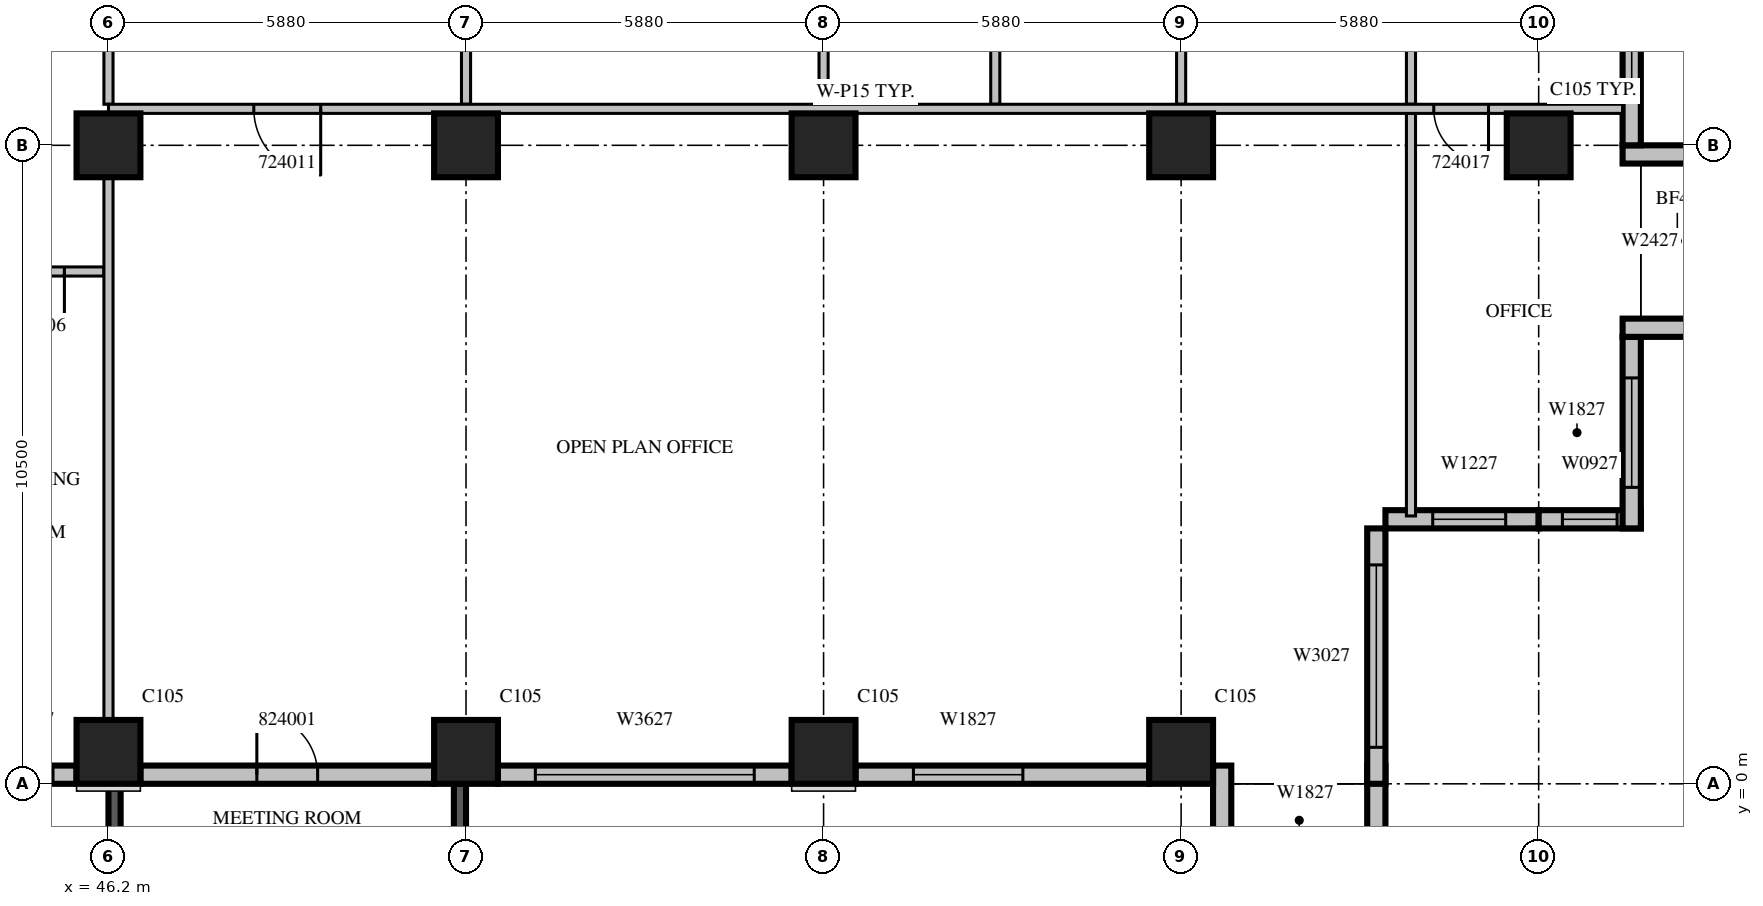
"""IFC4 building model, lengths in metres.
Left out: names, types, materials, properties, quantities, classifications, styles, units other than length and angle.
Written with IfcOpenShell. Run it as: python <this file> out.ifc"""

import sys

from ifc_helpers import new_model, si_unit, direction, frame, frame_2d, origin, origin_2d, place, context, subcontext, project, spatial, rectangle, extrude, source, transform, mapped, element, fill, save


model = new_model("IFC4")
c1 = context("Model", 3, precision=1e-05, world=origin(), true_north=direction((0.0, 1.0)))
c2 = subcontext(c1, "Body", "Model", "MODEL_VIEW")
j1 = project(units=[si_unit("LENGTHUNIT", "METRE"), si_unit("PLANEANGLEUNIT", "RADIAN")], contexts=[c1])
p1 = place(None, origin())
s1 = spatial("IfcSite", under=j1, at=p1, CompositionType="ELEMENT")
p2 = place(p1, origin())
s2 = spatial("IfcBuilding", under=s1, at=p2, CompositionType="ELEMENT")
p3 = place(p2, frame((0.0, 0.0, 111.9)))
s3 = spatial("IfcBuildingStorey", under=s2, at=p3, CompositionType="ELEMENT", Elevation=111.9)
m1 = source(origin(), c2, "Body", "SweptSolid", [
    extrude(rectangle(XDim=1.05, YDim=1.05, at=origin_2d()), origin(), (0.0, 0.0, 1.0), 4.2),
])
for number, where, z_axis, x_axis in (
    (1, (46.2, 0.525, 0.0), (0.0, 0.0, 1.0), (1.0, 0.0, 0.0)),
    (2, (52.08, 0.525, 0.0), (0.0, 0.0, 1.0), (1.0, 0.0, 0.0)),
    (3, (57.96, 0.525, 0.0), (0.0, 0.0, 1.0), (1.0, 0.0, 0.0)),
    (4, (63.84, 0.525, 0.0), (0.0, 0.0, 1.0), (1.0, 0.0, 0.0)),
    (5, (46.2, 10.5, 0.0), (0.0, 0.0, 1.0), (1.0, 0.0, 0.0)),
    (6, (52.08, 10.5, 0.0), (0.0, 0.0, 1.0), (1.0, 0.0, 0.0)),
    (7, (57.96, 10.5, 0.0), (0.0, 0.0, 1.0), (1.0, 0.0, 0.0)),
    (8, (63.84, 10.5, 0.0), (0.0, 0.0, 1.0), (1.0, 0.0, 0.0)),
    (9, (69.72, 10.5, 0.0), (0.0, 0.0, 1.0), (1.0, 0.0, 0.0)),
):
    element("IfcColumn", number, at=place(p3, frame(where, z_axis=z_axis, x_axis=x_axis)), inside=s3, PredefinedType="COLUMN", context=c2, shape_type="MappedRepresentation", body=[
        mapped(m1, transform((0.0, 0.0, 0.0), scale=1.0)),
    ])
m2 = source(origin(), c2, "Body", "SweptSolid", [
    extrude(rectangle(XDim=3.9, YDim=0.2, at=frame_2d((1.95, 0.0))), origin(), (0.0, 0.0, 1.0), 3.8),
])
p4 = place(p3, frame((46.3, 0.0, 0.0), z_axis=(0.0, 0.0, 1.0), x_axis=(0.0, -1.0, 0.0)))
e10 = element("IfcWall", 10, at=p4, inside=s3, PredefinedType="SOLIDWALL", context=c2, shape_type="MappedRepresentation", body=[
    mapped(m2, transform((0.0, 0.0, 0.0), scale=1.0)),
])
m3 = source(origin(), c2, "Body", "SweptSolid", [
    extrude(rectangle(XDim=2.4, YDim=2.7, at=frame_2d((1.2, 1.35))), frame((0.0, 0.11, 0.0), z_axis=(0.0, -1.0, 0.0), x_axis=(1.0, 0.0, 0.0)), (0.0, 0.0, 1.0), 0.22),
])
p5 = place(p4, frame((0.75, 0.0, 0.6)))
e11 = element("IfcOpeningElement", 11, at=p5, cuts=e10, PredefinedType="OPENING", context=c2, shape_type="MappedRepresentation", body=[
    mapped(m3, transform((0.0, 0.0, 0.0), scale=1.0)),
])
p6 = place(p3, frame((51.98, 0.0, 0.0), z_axis=(0.0, 0.0, 1.0), x_axis=(0.0, -1.0, 0.0)))
e12 = element("IfcWall", 12, at=p6, inside=s3, PredefinedType="SOLIDWALL", context=c2, shape_type="MappedRepresentation", body=[
    mapped(m2, transform((0.0, 0.0, 0.0), scale=1.0)),
])
p7 = place(p6, frame((0.75, 0.0, 0.6)))
e13 = element("IfcOpeningElement", 13, at=p7, cuts=e12, PredefinedType="OPENING", context=c2, shape_type="MappedRepresentation", body=[
    mapped(m3, transform((0.0, 0.0, 0.0), scale=1.0)),
])
m4 = source(origin(), c2, "Body", "SweptSolid", [
    extrude(rectangle(XDim=1.675, YDim=0.3, at=frame_2d((0.838, 0.0))), origin(), (0.0, 0.0, 1.0), 3.8),
])
p8 = place(p3, frame((44.0, 0.15, 0.0), z_axis=(0.0, 0.0, 1.0), x_axis=(1.0, 0.0, 0.0)))
e14 = element("IfcWall", 14, at=p8, inside=s3, PredefinedType="STANDARD", context=c2, shape_type="MappedRepresentation", body=[
    mapped(m4, transform((0.0, 0.0, 0.0), scale=1.0)),
])
m5 = source(origin(), c2, "Body", "SweptSolid", [
    extrude(rectangle(XDim=0.9, YDim=2.7, at=frame_2d((0.45, 1.35))), frame((0.0, 0.16, 0.0), z_axis=(0.0, -1.0, 0.0), x_axis=(1.0, 0.0, 0.0)), (0.0, 0.0, 1.0), 0.32),
])
p9 = place(p8, frame((0.388, 0.0, 0.6)))
e15 = element("IfcOpeningElement", 15, at=p9, cuts=e14, PredefinedType="OPENING", context=c2, shape_type="MappedRepresentation", body=[
    mapped(m5, transform((0.0, 0.0, 0.0), scale=1.0)),
])
m6 = source(origin(), c2, "Body", "SweptSolid", [
    extrude(rectangle(XDim=4.83, YDim=0.3, at=frame_2d((2.415, 0.0))), origin(), (0.0, 0.0, 1.0), 3.8),
])
p10 = place(p3, frame((46.725, 0.15, 0.0), z_axis=(0.0, 0.0, 1.0), x_axis=(1.0, 0.0, 0.0)))
e16 = element("IfcWall", 16, at=p10, inside=s3, PredefinedType="STANDARD", context=c2, shape_type="MappedRepresentation", body=[
    mapped(m6, transform((0.0, 0.0, 0.0), scale=1.0)),
])
m7 = source(origin(), c2, "Body", "SweptSolid", [
    extrude(rectangle(XDim=1.0, YDim=2.1, at=frame_2d((0.5, 1.05))), frame((0.0, 0.16, 0.0), z_axis=(0.0, -1.0, 0.0), x_axis=(1.0, 0.0, 0.0)), (0.0, 0.0, 1.0), 0.32),
])
p11 = place(p10, frame((1.915, 0.0, 0.0)))
e17 = element("IfcOpeningElement", 17, at=p11, cuts=e16, PredefinedType="OPENING", context=c2, shape_type="MappedRepresentation", body=[
    mapped(m7, transform((0.0, 0.0, 0.0), scale=1.0)),
])
p12 = place(p3, frame((52.605, 0.15, 0.0), z_axis=(0.0, 0.0, 1.0), x_axis=(1.0, 0.0, 0.0)))
e18 = element("IfcWall", 18, at=p12, inside=s3, PredefinedType="STANDARD", context=c2, shape_type="MappedRepresentation", body=[
    mapped(m6, transform((0.0, 0.0, 0.0), scale=1.0)),
])
m8 = source(origin(), c2, "Body", "SweptSolid", [
    extrude(rectangle(XDim=3.6, YDim=2.7, at=frame_2d((1.8, 1.35))), frame((0.0, 0.16, 0.0), z_axis=(0.0, -1.0, 0.0), x_axis=(1.0, 0.0, 0.0)), (0.0, 0.0, 1.0), 0.32),
])
p13 = place(p12, frame((0.615, 0.0, 0.6)))
e19 = element("IfcOpeningElement", 19, at=p13, cuts=e18, PredefinedType="OPENING", context=c2, shape_type="MappedRepresentation", body=[
    mapped(m8, transform((0.0, 0.0, 0.0), scale=1.0)),
])
p14 = place(p3, frame((58.485, 0.15, 0.0), z_axis=(0.0, 0.0, 1.0), x_axis=(1.0, 0.0, 0.0)))
e20 = element("IfcWall", 20, at=p14, inside=s3, PredefinedType="STANDARD", context=c2, shape_type="MappedRepresentation", body=[
    mapped(m6, transform((0.0, 0.0, 0.0), scale=1.0)),
])
m9 = source(origin(), c2, "Body", "SweptSolid", [
    extrude(rectangle(XDim=1.8, YDim=2.7, at=frame_2d((0.9, 1.35))), frame((0.0, 0.16, 0.0), z_axis=(0.0, -1.0, 0.0), x_axis=(1.0, 0.0, 0.0)), (0.0, 0.0, 1.0), 0.32),
])
p15 = place(p14, frame((0.953, 0.0, 0.6)))
e21 = element("IfcOpeningElement", 21, at=p15, cuts=e20, PredefinedType="OPENING", context=c2, shape_type="MappedRepresentation", body=[
    mapped(m9, transform((0.0, 0.0, 0.0), scale=1.0)),
])
m10 = source(origin(), c2, "Body", "SweptSolid", [
    extrude(rectangle(XDim=1.2, YDim=0.3, at=frame_2d((0.6, 0.0))), origin(), (0.0, 0.0, 1.0), 3.8),
])
for number, where, z_axis, x_axis in (
    (22, (64.515, 0.3, 0.0), (0.0, 0.0, 1.0), (0.0, -1.0, 0.0)),
    (23, (67.05, 0.3, 0.0), (0.0, 0.0, 1.0), (0.0, -1.0, 0.0)),
):
    element("IfcWall", number, at=place(p3, frame(where, z_axis=z_axis, x_axis=x_axis)), inside=s3, PredefinedType="STANDARD", context=c2, shape_type="MappedRepresentation", body=[
        mapped(m10, transform((0.0, 0.0, 0.0), scale=1.0)),
    ])
m11 = source(origin(), c2, "Body", "SweptSolid", [
    extrude(rectangle(XDim=4.2, YDim=0.3, at=frame_2d((2.1, 0.0))), origin(), (0.0, 0.0, 1.0), 3.8),
])
p16 = place(p3, frame((67.05, 0.0, 0.0), z_axis=(0.0, 0.0, 1.0), x_axis=(0.0, 1.0, 0.0)))
e24 = element("IfcWall", 24, at=p16, inside=s3, PredefinedType="STANDARD", context=c2, shape_type="MappedRepresentation", body=[
    mapped(m11, transform((0.0, 0.0, 0.0), scale=1.0)),
])
m12 = source(origin(), c2, "Body", "SweptSolid", [
    extrude(rectangle(XDim=3.0, YDim=2.7, at=frame_2d((1.5, 1.35))), frame((0.0, 0.16, 0.0), z_axis=(0.0, -1.0, 0.0), x_axis=(1.0, 0.0, 0.0)), (0.0, 0.0, 1.0), 0.32),
])
p17 = place(p16, frame((0.6, 0.0, 0.6)))
e25 = element("IfcOpeningElement", 25, at=p17, cuts=e24, PredefinedType="OPENING", context=c2, shape_type="MappedRepresentation", body=[
    mapped(m12, transform((0.0, 0.0, 0.0), scale=1.0)),
])
m13 = source(origin(), c2, "Body", "SweptSolid", [
    extrude(rectangle(XDim=2.52, YDim=0.3, at=frame_2d((1.26, 0.0))), origin(), (0.0, 0.0, 1.0), 3.8),
])
p18 = place(p3, frame((67.2, 4.35, 0.0), z_axis=(0.0, 0.0, 1.0), x_axis=(1.0, 0.0, 0.0)))
e26 = element("IfcWall", 26, at=p18, inside=s3, PredefinedType="STANDARD", context=c2, shape_type="MappedRepresentation", body=[
    mapped(m13, transform((0.0, 0.0, 0.0), scale=1.0)),
])
m14 = source(origin(), c2, "Body", "SweptSolid", [
    extrude(rectangle(XDim=1.2, YDim=2.7, at=frame_2d((0.6, 1.35))), frame((0.0, 0.16, 0.0), z_axis=(0.0, -1.0, 0.0), x_axis=(1.0, 0.0, 0.0)), (0.0, 0.0, 1.0), 0.32),
])
p19 = place(p18, frame((0.777, 0.0, 0.6)))
e27 = element("IfcOpeningElement", 27, at=p19, cuts=e26, PredefinedType="OPENING", context=c2, shape_type="MappedRepresentation", body=[
    mapped(m14, transform((0.0, 0.0, 0.0), scale=1.0)),
])
m15 = source(origin(), c2, "Body", "SweptSolid", [
    extrude(rectangle(XDim=1.68, YDim=0.3, at=frame_2d((0.84, 0.0))), origin(), (0.0, 0.0, 1.0), 3.8),
])
p20 = place(p3, frame((69.72, 4.35, 0.0), z_axis=(0.0, 0.0, 1.0), x_axis=(1.0, 0.0, 0.0)))
e28 = element("IfcWall", 28, at=p20, inside=s3, PredefinedType="STANDARD", context=c2, shape_type="MappedRepresentation", body=[
    mapped(m15, transform((0.0, 0.0, 0.0), scale=1.0)),
])
p21 = place(p20, frame((0.39, 0.0, 0.6)))
e29 = element("IfcOpeningElement", 29, at=p21, cuts=e28, PredefinedType="OPENING", context=c2, shape_type="MappedRepresentation", body=[
    mapped(m5, transform((0.0, 0.0, 0.0), scale=1.0)),
])
m16 = source(origin(), c2, "Body", "SweptSolid", [
    extrude(rectangle(XDim=3.15, YDim=0.3, at=frame_2d((1.575, 0.0))), origin(), (0.0, 0.0, 1.0), 3.8),
])
p22 = place(p3, frame((71.25, 4.2, 0.0), z_axis=(0.0, 0.0, 1.0), x_axis=(0.0, 1.0, 0.0)))
e30 = element("IfcWall", 30, at=p22, inside=s3, PredefinedType="STANDARD", context=c2, shape_type="MappedRepresentation", body=[
    mapped(m16, transform((0.0, 0.0, 0.0), scale=1.0)),
])
p23 = place(p22, frame((0.675, 0.0, 0.6)))
e31 = element("IfcOpeningElement", 31, at=p23, cuts=e30, PredefinedType="OPENING", context=c2, shape_type="MappedRepresentation", body=[
    mapped(m9, transform((0.0, 0.0, 0.0), scale=1.0)),
])
for number, where, z_axis, x_axis in (
    (32, (71.1, 7.5, 0.0), (0.0, 0.0, 1.0), (1.0, 0.0, 0.0)),
    (33, (71.1, 10.35, 0.0), (0.0, 0.0, 1.0), (1.0, 0.0, 0.0)),
):
    element("IfcWall", number, at=place(p3, frame(where, z_axis=z_axis, x_axis=x_axis)), inside=s3, PredefinedType="STANDARD", context=c2, shape_type="MappedRepresentation", body=[
        mapped(m10, transform((0.0, 0.0, 0.0), scale=1.0)),
    ])
m17 = source(origin(), c2, "Body", "SweptSolid", [
    extrude(rectangle(XDim=6.3, YDim=0.3, at=frame_2d((3.15, 0.0))), origin(), (0.0, 0.0, 1.0), 3.8),
])
p24 = place(p3, frame((71.25, 10.5, 0.0), z_axis=(0.0, 0.0, 1.0), x_axis=(0.0, 1.0, 0.0)))
e34 = element("IfcWall", 34, at=p24, inside=s3, PredefinedType="STANDARD", context=c2, shape_type="MappedRepresentation", body=[
    mapped(m17, transform((0.0, 0.0, 0.0), scale=1.0)),
])
p25 = place(p24, frame((1.025, 0.0, 0.6)))
e35 = element("IfcOpeningElement", 35, at=p25, cuts=e34, PredefinedType="OPENING", context=c2, shape_type="MappedRepresentation", body=[
    mapped(m14, transform((0.0, 0.0, 0.0), scale=1.0)),
])
m18 = source(origin(), c2, "Body", "SweptSolid", [
    extrude(rectangle(XDim=2.2, YDim=0.15, at=frame_2d((1.1, 0.0))), origin(), (0.0, 0.0, 1.0), 3.8),
])
p26 = place(p3, frame((46.125, 8.425, 0.0), z_axis=(0.0, 0.0, 1.0), x_axis=(-1.0, 0.0, 0.0)))
e36 = element("IfcWall", 36, at=p26, inside=s3, PredefinedType="PARTITIONING", context=c2, shape_type="MappedRepresentation", body=[
    mapped(m18, transform((0.0, 0.0, 0.0), scale=1.0)),
])
m19 = source(origin(), c2, "Body", "SweptSolid", [
    extrude(rectangle(XDim=0.9, YDim=2.1, at=frame_2d((0.45, 1.05))), frame((0.0, 0.085, 0.0), z_axis=(0.0, -1.0, 0.0), x_axis=(1.0, 0.0, 0.0)), (0.0, 0.0, 1.0), 0.17),
])
p27 = place(p26, frame((0.65, 0.0, 0.0)))
e37 = element("IfcOpeningElement", 37, at=p27, cuts=e36, PredefinedType="OPENING", context=c2, shape_type="MappedRepresentation", body=[
    mapped(m19, transform((0.0, 0.0, 0.0), scale=1.0)),
])
m20 = source(origin(), c2, "Body", "SweptSolid", [
    extrude(rectangle(XDim=3.525, YDim=0.15, at=frame_2d((1.762, 0.0))), origin(), (0.0, 0.0, 1.0), 3.8),
])
for number, where, z_axis, x_axis in (
    (38, (52.08, 11.175, 0.0), (0.0, 0.0, 1.0), (0.0, 1.0, 0.0)),
    (39, (57.96, 11.175, 0.0), (0.0, 0.0, 1.0), (0.0, 1.0, 0.0)),
    (40, (60.784, 11.175, 0.0), (0.0, 0.0, 1.0), (0.0, 1.0, 0.0)),
    (41, (63.84, 11.175, 0.0), (0.0, 0.0, 1.0), (0.0, 1.0, 0.0)),
):
    element("IfcWall", number, at=place(p3, frame(where, z_axis=z_axis, x_axis=x_axis)), inside=s3, PredefinedType="PARTITIONING", context=c2, shape_type="MappedRepresentation", body=[
        mapped(m20, transform((0.0, 0.0, 0.0), scale=1.0)),
    ])
m21 = source(origin(), c2, "Body", "SweptSolid", [
    extrude(rectangle(XDim=8.927, YDim=0.15, at=frame_2d((4.463, 0.0))), origin(), (0.0, 0.0, 1.0), 3.8),
])
p28 = place(p3, frame((46.2, 1.049, 0.0), z_axis=(0.0, 0.0, 1.0), x_axis=(0.0, 1.0, 0.0)))
e42 = element("IfcWall", 42, at=p28, inside=s3, PredefinedType="PARTITIONING", context=c2, shape_type="MappedRepresentation", body=[
    mapped(m21, transform((0.0, 0.0, 0.0), scale=1.0)),
])
p29 = place(p3, frame((46.2, 11.175, 0.0), z_axis=(0.0, 0.0, 1.0), x_axis=(0.0, 1.0, 0.0)))
e43 = element("IfcWall", 43, at=p29, inside=s3, PredefinedType="PARTITIONING", context=c2, shape_type="MappedRepresentation", body=[
    mapped(m20, transform((0.0, 0.0, 0.0), scale=1.0)),
])
m22 = source(origin(), c2, "Body", "SweptSolid", [
    extrude(rectangle(XDim=6.62, YDim=0.15, at=frame_2d((3.31, 0.0))), origin(), (0.0, 0.0, 1.0), 3.8),
])
p30 = place(p3, frame((67.62, 4.405, 0.0), z_axis=(0.0, 0.0, 1.0), x_axis=(0.0, 1.0, 0.0)))
e44 = element("IfcWall", 44, at=p30, inside=s3, PredefinedType="PARTITIONING", context=c2, shape_type="MappedRepresentation", body=[
    mapped(m22, transform((0.0, 0.0, 0.0), scale=1.0)),
])
p31 = place(p3, frame((67.62, 11.175, 0.0), z_axis=(0.0, 0.0, 1.0), x_axis=(0.0, 1.0, 0.0)))
e45 = element("IfcWall", 45, at=p31, inside=s3, PredefinedType="PARTITIONING", context=c2, shape_type="MappedRepresentation", body=[
    mapped(m20, transform((0.0, 0.0, 0.0), scale=1.0)),
])
m23 = source(origin(), c2, "Body", "SweptSolid", [
    extrude(rectangle(XDim=24.9, YDim=0.15, at=frame_2d((12.45, 0.0))), origin(), (0.0, 0.0, 1.0), 3.8),
])
p32 = place(p3, frame((71.1, 11.1, 0.0), z_axis=(0.0, 0.0, 1.0), x_axis=(-1.0, 0.0, 0.0)))
e46 = element("IfcWall", 46, at=p32, inside=s3, PredefinedType="PARTITIONING", context=c2, shape_type="MappedRepresentation", body=[
    mapped(m23, transform((0.0, 0.0, 0.0), scale=1.0)),
])
m24 = source(origin(), c2, "Body", "SweptSolid", [
    extrude(rectangle(XDim=1.1, YDim=2.1, at=frame_2d((0.55, 1.05))), frame((0.0, 0.085, 0.0), z_axis=(0.0, -1.0, 0.0), x_axis=(1.0, 0.0, 0.0)), (0.0, 0.0, 1.0), 0.17),
])
p33 = place(p32, frame((21.41, 0.0, 0.0)))
e47 = element("IfcOpeningElement", 47, at=p33, cuts=e46, PredefinedType="OPENING", context=c2, shape_type="MappedRepresentation", body=[
    mapped(m24, transform((0.0, 0.0, 0.0), scale=1.0)),
])
p34 = place(p32, frame((2.205, 0.0, 0.0)))
e48 = element("IfcOpeningElement", 48, at=p34, cuts=e46, PredefinedType="OPENING", context=c2, shape_type="MappedRepresentation", body=[
    mapped(m19, transform((0.0, 0.0, 0.0), scale=1.0)),
])
m25 = source(origin(), c2, "Body", "SweptSolid", [
    extrude(rectangle(XDim=0.9, YDim=2.7, at=frame_2d((0.45, 1.35))), frame((0.0, 0.03, 0.0), z_axis=(0.0, -1.0, 0.0), x_axis=(1.0, 0.0, 0.0)), (0.0, 0.0, 1.0), 0.06),
])
p35 = place(p9, origin())
e49 = element("IfcWindow", 49, at=p35, inside=s3, PartitioningType="SINGLE_PANEL", PredefinedType="WINDOW", context=c2, shape_type="MappedRepresentation", body=[
    mapped(m25, transform((0.0, 0.0, 0.0), scale=1.0)),
])
fill(e15, e49)
m26 = source(origin(), c2, "Body", "SweptSolid", [
    extrude(rectangle(XDim=3.6, YDim=2.7, at=frame_2d((1.8, 1.35))), frame((0.0, 0.03, 0.0), z_axis=(0.0, -1.0, 0.0), x_axis=(1.0, 0.0, 0.0)), (0.0, 0.0, 1.0), 0.06),
])
p36 = place(p13, origin())
e50 = element("IfcWindow", 50, at=p36, inside=s3, PartitioningType="SINGLE_PANEL", PredefinedType="WINDOW", context=c2, shape_type="MappedRepresentation", body=[
    mapped(m26, transform((0.0, 0.0, 0.0), scale=1.0)),
])
fill(e19, e50)
m27 = source(origin(), c2, "Body", "SweptSolid", [
    extrude(rectangle(XDim=1.8, YDim=2.7, at=frame_2d((0.9, 1.35))), frame((0.0, 0.03, 0.0), z_axis=(0.0, -1.0, 0.0), x_axis=(1.0, 0.0, 0.0)), (0.0, 0.0, 1.0), 0.06),
])
p37 = place(p15, origin())
e51 = element("IfcWindow", 51, at=p37, inside=s3, PartitioningType="SINGLE_PANEL", PredefinedType="WINDOW", context=c2, shape_type="MappedRepresentation", body=[
    mapped(m27, transform((0.0, 0.0, 0.0), scale=1.0)),
])
fill(e21, e51)
m28 = source(origin(), c2, "Body", "SweptSolid", [
    extrude(rectangle(XDim=3.0, YDim=2.7, at=frame_2d((1.5, 1.35))), frame((0.0, 0.03, 0.0), z_axis=(0.0, -1.0, 0.0), x_axis=(1.0, 0.0, 0.0)), (0.0, 0.0, 1.0), 0.06),
])
p38 = place(p17, origin())
e52 = element("IfcWindow", 52, at=p38, inside=s3, PartitioningType="SINGLE_PANEL", PredefinedType="WINDOW", context=c2, shape_type="MappedRepresentation", body=[
    mapped(m28, transform((0.0, 0.0, 0.0), scale=1.0)),
])
fill(e25, e52)
m29 = source(origin(), c2, "Body", "SweptSolid", [
    extrude(rectangle(XDim=1.2, YDim=2.7, at=frame_2d((0.6, 1.35))), frame((0.0, 0.03, 0.0), z_axis=(0.0, -1.0, 0.0), x_axis=(1.0, 0.0, 0.0)), (0.0, 0.0, 1.0), 0.06),
])
p39 = place(p19, origin())
e53 = element("IfcWindow", 53, at=p39, inside=s3, PartitioningType="SINGLE_PANEL", PredefinedType="WINDOW", context=c2, shape_type="MappedRepresentation", body=[
    mapped(m29, transform((0.0, 0.0, 0.0), scale=1.0)),
])
fill(e27, e53)
p40 = place(p21, origin())
e54 = element("IfcWindow", 54, at=p40, inside=s3, PartitioningType="SINGLE_PANEL", PredefinedType="WINDOW", context=c2, shape_type="MappedRepresentation", body=[
    mapped(m25, transform((0.0, 0.0, 0.0), scale=1.0)),
])
fill(e29, e54)
p41 = place(p23, origin())
e55 = element("IfcWindow", 55, at=p41, inside=s3, PartitioningType="SINGLE_PANEL", PredefinedType="WINDOW", context=c2, shape_type="MappedRepresentation", body=[
    mapped(m27, transform((0.0, 0.0, 0.0), scale=1.0)),
])
fill(e31, e55)
p42 = place(p25, origin())
e56 = element("IfcWindow", 56, at=p42, inside=s3, PartitioningType="SINGLE_PANEL", PredefinedType="WINDOW", context=c2, shape_type="MappedRepresentation", body=[
    mapped(m29, transform((0.0, 0.0, 0.0), scale=1.0)),
])
fill(e35, e56)
m30 = source(origin(), c2, "Body", "SweptSolid", [
    extrude(rectangle(XDim=0.9, YDim=2.1, at=frame_2d((0.45, 1.05))), frame((0.0, 0.025, 0.0), z_axis=(0.0, -1.0, 0.0), x_axis=(1.0, 0.0, 0.0)), (0.0, 0.0, 1.0), 0.05),
])
p43 = place(p27, origin())
e57 = element("IfcDoor", 57, at=p43, inside=s3, OperationType="SINGLE_SWING_LEFT", PredefinedType="DOOR", context=c2, shape_type="MappedRepresentation", body=[
    mapped(m30, transform((0.0, 0.0, 0.0), scale=1.0)),
])
fill(e37, e57)
m31 = source(origin(), c2, "Body", "SweptSolid", [
    extrude(rectangle(XDim=1.1, YDim=2.1, at=frame_2d((0.55, 1.05))), frame((0.0, 0.025, 0.0), z_axis=(0.0, -1.0, 0.0), x_axis=(1.0, 0.0, 0.0)), (0.0, 0.0, 1.0), 0.05),
])
p44 = place(p33, origin())
e58 = element("IfcDoor", 58, at=p44, inside=s3, OperationType="SINGLE_SWING_LEFT", PredefinedType="DOOR", context=c2, shape_type="MappedRepresentation", body=[
    mapped(m31, transform((0.0, 0.0, 0.0), scale=1.0)),
])
fill(e47, e58)
p45 = place(p34, origin())
e59 = element("IfcDoor", 59, at=p45, inside=s3, OperationType="SINGLE_SWING_LEFT", PredefinedType="DOOR", context=c2, shape_type="MappedRepresentation", body=[
    mapped(m30, transform((0.0, 0.0, 0.0), scale=1.0)),
])
fill(e48, e59)
m32 = source(origin(), c2, "Body", "SweptSolid", [
    extrude(rectangle(XDim=1.0, YDim=2.1, at=frame_2d((0.5, 1.05))), frame((0.0, 0.025, 0.0), z_axis=(0.0, -1.0, 0.0), x_axis=(1.0, 0.0, 0.0)), (0.0, 0.0, 1.0), 0.05),
])
p46 = place(p11, origin())
e60 = element("IfcDoor", 60, at=p46, inside=s3, OperationType="SINGLE_SWING_LEFT", PredefinedType="DOOR", context=c2, shape_type="MappedRepresentation", body=[
    mapped(m32, transform((0.0, 0.0, 0.0), scale=1.0)),
])
fill(e17, e60)
save(model, sys.argv[1])
